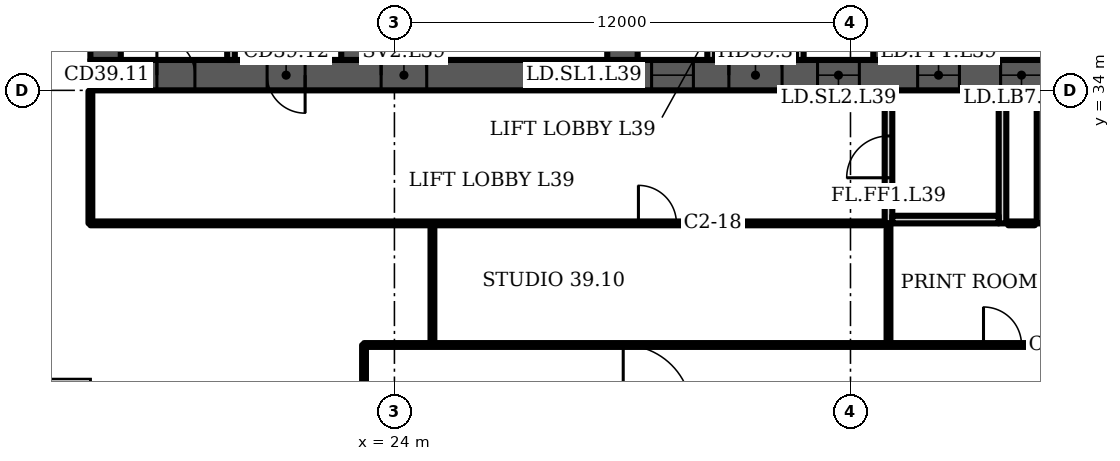
"""IFC4 building model, lengths in metres.
Left out: names, types, materials, properties, quantities, classifications, styles, units other than length and angle.
Written with IfcOpenShell. Run it as: python <this file> out.ifc"""

import sys

from ifc_helpers import new_model, si_unit, direction, frame, frame_2d, origin, place, context, subcontext, project, spatial, polyline, rectangle, outline, extrude, element, fill, save


model = new_model("IFC4")
c1 = context("Model", 3, precision=1e-05, world=origin(), true_north=direction((0.0, 1.0)))
c2 = subcontext(c1, "Body", "Model", "MODEL_VIEW")
j1 = project(units=[si_unit("LENGTHUNIT", "METRE"), si_unit("PLANEANGLEUNIT", "RADIAN")], contexts=[c1])
p1 = place(None, origin())
s1 = spatial("IfcSite", under=j1, at=p1, CompositionType="ELEMENT")
p2 = place(p1, origin())
s2 = spatial("IfcBuilding", under=s1, at=p2, CompositionType="ELEMENT")
p3 = place(p2, frame((0.0, 0.0, 162.7)))
s3 = spatial("IfcBuildingStorey", under=s2, at=p3, CompositionType="ELEMENT", Elevation=162.7)
p4 = place(p3, frame((16.0, 34.4, 0.0), z_axis=(0.0, 0.0, 1.0), x_axis=(1.0, 0.0, 0.0)))
e1 = element("IfcWall", 1, at=p4, inside=s3, PredefinedType="SHEAR", context=c2, shape_type="SweptSolid", body=[
    extrude(rectangle(XDim=42.0, YDim=0.8, at=frame_2d((21.0, 0.0))), origin(), (0.0, 0.0, 1.0), 3.6),
])
p5 = place(p4, frame((1.75, 0.0, 0.0)))
e2 = element("IfcOpeningElement", 2, at=p5, cuts=e1, PredefinedType="OPENING", context=c2, shape_type="SweptSolid", body=[
    extrude(rectangle(XDim=1.0, YDim=2.1, at=frame_2d((0.5, 1.05))), frame((0.0, 0.41, 0.0), z_axis=(0.0, -1.0, 0.0), x_axis=(1.0, 0.0, 0.0)), (0.0, 0.0, 1.0), 0.82),
])
p6 = place(p4, frame((4.65, 0.0, 0.0)))
e3 = element("IfcOpeningElement", 3, at=p6, cuts=e1, PredefinedType="OPENING", context=c2, shape_type="SweptSolid", body=[
    extrude(rectangle(XDim=1.0, YDim=2.1, at=frame_2d((0.5, 1.05))), frame((0.0, 0.41, 0.0), z_axis=(0.0, -1.0, 0.0), x_axis=(1.0, 0.0, 0.0)), (0.0, 0.0, 1.0), 0.82),
])
p7 = place(p4, frame((7.65, 0.0, 0.0)))
e4 = element("IfcOpeningElement", 4, at=p7, cuts=e1, PredefinedType="OPENING", context=c2, shape_type="SweptSolid", body=[
    extrude(rectangle(XDim=1.2, YDim=2.1, at=frame_2d((0.6, 1.05))), frame((0.0, 0.41, 0.0), z_axis=(0.0, -1.0, 0.0), x_axis=(1.0, 0.0, 0.0)), (0.0, 0.0, 1.0), 0.82),
])
p8 = place(p4, frame((14.767, 0.0, 0.0)))
e5 = element("IfcOpeningElement", 5, at=p8, cuts=e1, PredefinedType="OPENING", context=c2, shape_type="SweptSolid", body=[
    extrude(rectangle(XDim=1.1, YDim=2.1, at=frame_2d((0.55, 1.05))), frame((0.0, 0.41, 0.0), z_axis=(0.0, -1.0, 0.0), x_axis=(1.0, 0.0, 0.0)), (0.0, 0.0, 1.0), 0.82),
])
p9 = place(p4, frame((19.133, 0.0, 0.0)))
e6 = element("IfcOpeningElement", 6, at=p9, cuts=e1, PredefinedType="OPENING", context=c2, shape_type="SweptSolid", body=[
    extrude(rectangle(XDim=1.1, YDim=2.1, at=frame_2d((0.55, 1.05))), frame((0.0, 0.41, 0.0), z_axis=(0.0, -1.0, 0.0), x_axis=(1.0, 0.0, 0.0)), (0.0, 0.0, 1.0), 0.82),
])
p10 = place(p4, frame((16.8, 0.0, 0.0)))
e7 = element("IfcOpeningElement", 7, at=p10, cuts=e1, PredefinedType="OPENING", context=c2, shape_type="SweptSolid", body=[
    extrude(rectangle(XDim=1.4, YDim=2.1, at=frame_2d((0.7, 1.05))), frame((0.0, 0.41, 0.0), z_axis=(0.0, -1.0, 0.0), x_axis=(1.0, 0.0, 0.0)), (0.0, 0.0, 1.0), 0.82),
])
p11 = place(p4, frame((21.767, 0.0, 0.0)))
e8 = element("IfcOpeningElement", 8, at=p11, cuts=e1, PredefinedType="OPENING", context=c2, shape_type="SweptSolid", body=[
    extrude(rectangle(XDim=1.1, YDim=2.1, at=frame_2d((0.55, 1.05))), frame((0.0, 0.41, 0.0), z_axis=(0.0, -1.0, 0.0), x_axis=(1.0, 0.0, 0.0)), (0.0, 0.0, 1.0), 0.82),
])
p12 = place(p4, frame((23.95, 0.0, 0.0)))
e9 = element("IfcOpeningElement", 9, at=p12, cuts=e1, PredefinedType="OPENING", context=c2, shape_type="SweptSolid", body=[
    extrude(rectangle(XDim=1.1, YDim=2.1, at=frame_2d((0.55, 1.05))), frame((0.0, 0.41, 0.0), z_axis=(0.0, -1.0, 0.0), x_axis=(1.0, 0.0, 0.0)), (0.0, 0.0, 1.0), 0.82),
])
p13 = place(p4, frame((26.133, 0.0, 0.0)))
e10 = element("IfcOpeningElement", 10, at=p13, cuts=e1, PredefinedType="OPENING", context=c2, shape_type="SweptSolid", body=[
    extrude(rectangle(XDim=1.1, YDim=2.1, at=frame_2d((0.55, 1.05))), frame((0.0, 0.41, 0.0), z_axis=(0.0, -1.0, 0.0), x_axis=(1.0, 0.0, 0.0)), (0.0, 0.0, 1.0), 0.82),
])
p14 = place(p4, frame((33.15, 0.0, 0.0)))
e11 = element("IfcOpeningElement", 11, at=p14, cuts=e1, PredefinedType="OPENING", context=c2, shape_type="SweptSolid", body=[
    extrude(rectangle(XDim=1.2, YDim=2.1, at=frame_2d((0.6, 1.05))), frame((0.0, 0.41, 0.0), z_axis=(0.0, -1.0, 0.0), x_axis=(1.0, 0.0, 0.0)), (0.0, 0.0, 1.0), 0.82),
])
p15 = place(p4, frame((35.817, 0.0, 0.0)))
e12 = element("IfcOpeningElement", 12, at=p15, cuts=e1, PredefinedType="OPENING", context=c2, shape_type="SweptSolid", body=[
    extrude(rectangle(XDim=1.0, YDim=2.1, at=frame_2d((0.5, 1.05))), frame((0.0, 0.41, 0.0), z_axis=(0.0, -1.0, 0.0), x_axis=(1.0, 0.0, 0.0)), (0.0, 0.0, 1.0), 0.82),
])
p16 = place(p4, frame((39.95, 0.0, 0.0)))
e13 = element("IfcOpeningElement", 13, at=p16, cuts=e1, PredefinedType="OPENING", context=c2, shape_type="SweptSolid", body=[
    extrude(rectangle(XDim=1.0, YDim=2.1, at=frame_2d((0.5, 1.05))), frame((0.0, 0.41, 0.0), z_axis=(0.0, -1.0, 0.0), x_axis=(1.0, 0.0, 0.0)), (0.0, 0.0, 1.0), 0.82),
])
p17 = place(p4, frame((37.767, 0.0, 0.0)))
e14 = element("IfcOpeningElement", 14, at=p17, cuts=e1, PredefinedType="OPENING", context=c2, shape_type="SweptSolid", body=[
    extrude(rectangle(XDim=1.4, YDim=2.1, at=frame_2d((0.7, 1.05))), frame((0.0, 0.41, 0.0), z_axis=(0.0, -1.0, 0.0), x_axis=(1.0, 0.0, 0.0)), (0.0, 0.0, 1.0), 0.82),
])
p18 = place(p3, frame((16.4, 34.8, 0.0), z_axis=(0.0, 0.0, 1.0), x_axis=(0.0, 1.0, 0.0)))
e15 = element("IfcWall", 15, at=p18, inside=s3, PredefinedType="SHEAR", context=c2, shape_type="SweptSolid", body=[
    extrude(rectangle(XDim=13.184, YDim=0.8, at=frame_2d((6.592, 0.0))), origin(), (0.0, 0.0, 1.0), 3.6),
])
p19 = place(p3, frame((23.0, 34.8, 0.0), z_axis=(0.0, 0.0, 1.0), x_axis=(0.0, 1.0, 0.0)))
e16 = element("IfcWall", 16, at=p19, inside=s3, PredefinedType="SHEAR", context=c2, shape_type="SweptSolid", body=[
    extrude(rectangle(XDim=13.762, YDim=0.8, at=frame_2d((6.881, 0.0))), origin(), (0.0, 0.0, 1.0), 3.6),
])
p20 = place(p19, frame((10.0, 0.0, 0.0)))
e17 = element("IfcOpeningElement", 17, at=p20, cuts=e16, PredefinedType="OPENING", context=c2, shape_type="SweptSolid", body=[
    extrude(rectangle(XDim=1.0, YDim=2.1, at=frame_2d((0.5, 1.05))), frame((0.0, 0.41, 0.0), z_axis=(0.0, -1.0, 0.0), x_axis=(1.0, 0.0, 0.0)), (0.0, 0.0, 1.0), 0.82),
])
p21 = place(p3, frame((30.0, 34.8, 0.0), z_axis=(0.0, 0.0, 1.0), x_axis=(0.0, 1.0, 0.0)))
e18 = element("IfcWall", 18, at=p21, inside=s3, PredefinedType="SHEAR", context=c2, shape_type="SweptSolid", body=[
    extrude(rectangle(XDim=14.374, YDim=0.8, at=frame_2d((7.187, 0.0))), origin(), (0.0, 0.0, 1.0), 3.6),
])
p22 = place(p21, frame((3.6, 0.0, 0.0)))
e19 = element("IfcOpeningElement", 19, at=p22, cuts=e18, PredefinedType="OPENING", context=c2, shape_type="SweptSolid", body=[
    extrude(rectangle(XDim=1.1, YDim=2.1, at=frame_2d((0.55, 1.05))), frame((0.0, 0.41, 0.0), z_axis=(0.0, -1.0, 0.0), x_axis=(1.0, 0.0, 0.0)), (0.0, 0.0, 1.0), 0.82),
])
p23 = place(p3, frame((37.0, 34.8, 0.0), z_axis=(0.0, 0.0, 1.0), x_axis=(0.0, 1.0, 0.0)))
e20 = element("IfcWall", 20, at=p23, inside=s3, PredefinedType="SHEAR", context=c2, shape_type="SweptSolid", body=[
    extrude(rectangle(XDim=14.987, YDim=0.8, at=frame_2d((7.493, 0.0))), origin(), (0.0, 0.0, 1.0), 3.6),
])
p24 = place(p23, frame((11.312, 0.0, 0.0)))
e21 = element("IfcOpeningElement", 21, at=p24, cuts=e20, PredefinedType="OPENING", context=c2, shape_type="SweptSolid", body=[
    extrude(rectangle(XDim=1.0, YDim=2.1, at=frame_2d((0.5, 1.05))), frame((0.0, 0.41, 0.0), z_axis=(0.0, -1.0, 0.0), x_axis=(1.0, 0.0, 0.0)), (0.0, 0.0, 1.0), 0.82),
])
p25 = place(p23, frame((3.6, 0.0, 0.0)))
e22 = element("IfcOpeningElement", 22, at=p25, cuts=e20, PredefinedType="OPENING", context=c2, shape_type="SweptSolid", body=[
    extrude(rectangle(XDim=1.1, YDim=2.1, at=frame_2d((0.55, 1.05))), frame((0.0, 0.41, 0.0), z_axis=(0.0, -1.0, 0.0), x_axis=(1.0, 0.0, 0.0)), (0.0, 0.0, 1.0), 0.82),
])
p26 = place(p3, frame((19.7, 34.8, 0.0), z_axis=(0.0, 0.0, 1.0), x_axis=(0.0, 1.0, 0.0)))
e23 = element("IfcWall", 23, at=p26, inside=s3, PredefinedType="PARTITIONING", context=c2, shape_type="SweptSolid", body=[
    extrude(rectangle(XDim=13.234, YDim=0.2, at=frame_2d((6.617, 0.0))), origin(), (0.0, 0.0, 1.0), 3.2),
])
p27 = place(p3, frame((0.0, 0.0, -0.0)))
e24 = element("IfcWall", 24, at=p27, inside=s3, PredefinedType="PARTITIONING", context=c2, shape_type="SweptSolid", body=[
    extrude(outline(polyline([(32.233, 37.65), (30.4, 37.65), (30.4, 37.85), (32.233, 37.85), (32.433, 37.85), (32.433, 34.8), (32.233, 34.8), (32.233, 37.65)])), origin(), (0.0, 0.0, 1.0), 3.2),
])
p28 = place(p3, frame((0.0, 0.0, -0.0)))
e25 = element("IfcWall", 25, at=p28, inside=s3, PredefinedType="PARTITIONING", context=c2, shape_type="SweptSolid", body=[
    extrude(outline(polyline([(34.567, 37.85), (34.767, 37.85), (36.6, 37.85), (36.6, 37.65), (34.767, 37.65), (34.767, 34.8), (34.567, 34.8), (34.567, 37.85)])), origin(), (0.0, 0.0, 1.0), 3.2),
])
p29 = place(p3, frame((0.0, 0.0, -0.0)))
e26 = element("IfcWall", 26, at=p29, inside=s3, PredefinedType="PARTITIONING", context=c2, shape_type="SweptSolid", body=[
    extrude(outline(polyline([(41.567, 37.1), (39.433, 37.1), (39.433, 34.8), (39.233, 34.8), (39.233, 37.65), (37.4, 37.65), (37.4, 37.85), (39.233, 37.85), (39.433, 37.85), (39.433, 37.3), (41.567, 37.3), (41.567, 37.55), (41.767, 37.55), (43.6, 37.55), (43.6, 37.35), (41.767, 37.35), (41.767, 34.8), (41.567, 34.8), (41.567, 37.1)])), origin(), (0.0, 0.0, 1.0), 3.2),
])
p30 = place(p3, frame((37.0, 30.5, 0.0), z_axis=(0.0, 0.0, 1.0), x_axis=(0.0, 1.0, 0.0)))
e27 = element("IfcWall", 27, at=p30, inside=s3, PredefinedType="PARTITIONING", context=c2, shape_type="SweptSolid", body=[
    extrude(rectangle(XDim=3.5, YDim=0.2, at=frame_2d((1.75, 0.0))), origin(), (0.0, 0.0, 1.0), 3.2),
])
p31 = place(p30, frame((1.2, 0.0, 0.0)))
e28 = element("IfcOpeningElement", 28, at=p31, cuts=e27, PredefinedType="OPENING", context=c2, shape_type="SweptSolid", body=[
    extrude(rectangle(XDim=1.1, YDim=2.1, at=frame_2d((0.55, 1.05))), frame((0.0, 0.11, 0.0), z_axis=(0.0, -1.0, 0.0), x_axis=(1.0, 0.0, 0.0)), (0.0, 0.0, 1.0), 0.22),
])
p32 = place(p3, frame((40.0, 30.5, 0.0), z_axis=(0.0, 0.0, 1.0), x_axis=(0.0, 1.0, 0.0)))
e29 = element("IfcWall", 29, at=p32, inside=s3, PredefinedType="PARTITIONING", context=c2, shape_type="SweptSolid", body=[
    extrude(rectangle(XDim=3.5, YDim=0.2, at=frame_2d((1.75, 0.0))), origin(), (0.0, 0.0, 1.0), 3.2),
])
p33 = place(p3, frame((37.1, 30.6, 0.0), z_axis=(0.0, 0.0, 1.0), x_axis=(1.0, 0.0, 0.0)))
e30 = element("IfcWall", 30, at=p33, inside=s3, PredefinedType="PARTITIONING", context=c2, shape_type="SweptSolid", body=[
    extrude(rectangle(XDim=2.8, YDim=0.2, at=frame_2d((1.4, 0.0))), origin(), (0.0, 0.0, 1.0), 3.2),
])
p34 = place(p3, frame((41.0, 30.5, 0.0), z_axis=(0.0, 0.0, 1.0), x_axis=(0.0, 1.0, 0.0)))
e31 = element("IfcWall", 31, at=p34, inside=s3, PredefinedType="PARTITIONING", context=c2, shape_type="SweptSolid", body=[
    extrude(rectangle(XDim=3.5, YDim=0.2, at=frame_2d((1.75, 0.0))), origin(), (0.0, 0.0, 1.0), 3.2),
])
p35 = place(p3, frame((16.0, 30.5, 0.0), z_axis=(0.0, 0.0, 1.0), x_axis=(0.0, 1.0, 0.0)))
e32 = element("IfcWall", 32, at=p35, inside=s3, PredefinedType="PARTITIONING", context=c2, shape_type="SweptSolid", body=[
    extrude(rectangle(XDim=3.48, YDim=0.1, at=frame_2d((1.74, 0.0))), origin(), (0.0, 0.0, 1.0), 3.2),
])
p36 = place(p3, frame((16.0, 30.5, 0.0), z_axis=(0.0, 0.0, 1.0), x_axis=(1.0, 0.0, 0.0)))
e33 = element("IfcWall", 33, at=p36, inside=s3, PredefinedType="PARTITIONING", context=c2, shape_type="SweptSolid", body=[
    extrude(rectangle(XDim=20.85, YDim=0.1, at=frame_2d((10.425, 0.0))), origin(), (0.0, 0.0, 1.0), 3.2),
])
p37 = place(p36, frame((14.42, 0.0, 0.0)))
e34 = element("IfcOpeningElement", 34, at=p37, cuts=e33, PredefinedType="OPENING", context=c2, shape_type="SweptSolid", body=[
    extrude(rectangle(XDim=1.0, YDim=2.1, at=frame_2d((0.5, 1.05))), frame((0.0, 0.06, 0.0), z_axis=(0.0, -1.0, 0.0), x_axis=(1.0, 0.0, 0.0)), (0.0, 0.0, 1.0), 0.12),
])
p38 = place(p3, frame((23.2, 25.125, 0.0), z_axis=(0.0, 0.0, 1.0), x_axis=(0.0, 1.0, 0.0)))
e35 = element("IfcWall", 35, at=p38, inside=s3, PredefinedType="PARTITIONING", context=c2, shape_type="SweptSolid", body=[
    extrude(rectangle(XDim=2.175, YDim=0.1, at=frame_2d((1.087, 0.0))), origin(), (0.0, 0.0, 1.0), 3.2),
])
p39 = place(p3, frame((23.2, 27.3, 0.0), z_axis=(0.0, 0.0, 1.0), x_axis=(1.0, 0.0, 0.0)))
e36 = element("IfcWall", 36, at=p39, inside=s3, PredefinedType="PARTITIONING", context=c2, shape_type="SweptSolid", body=[
    extrude(rectangle(XDim=33.9, YDim=0.1, at=frame_2d((16.95, 0.0))), origin(), (0.0, 0.0, 1.0), 3.2),
])
p40 = place(p39, frame((16.3, 0.0, 0.0)))
e37 = element("IfcOpeningElement", 37, at=p40, cuts=e36, PredefinedType="OPENING", context=c2, shape_type="SweptSolid", body=[
    extrude(rectangle(XDim=1.0, YDim=2.1, at=frame_2d((0.5, 1.05))), frame((0.0, 0.06, 0.0), z_axis=(0.0, -1.0, 0.0), x_axis=(1.0, 0.0, 0.0)), (0.0, 0.0, 1.0), 0.12),
])
p41 = place(p39, frame((20.72, 0.0, 0.0)))
e38 = element("IfcOpeningElement", 38, at=p41, cuts=e36, PredefinedType="OPENING", context=c2, shape_type="SweptSolid", body=[
    extrude(rectangle(XDim=1.0, YDim=2.1, at=frame_2d((0.5, 1.05))), frame((0.0, 0.06, 0.0), z_axis=(0.0, -1.0, 0.0), x_axis=(1.0, 0.0, 0.0)), (0.0, 0.0, 1.0), 0.12),
])
p42 = place(p39, frame((23.54, 0.0, 0.0)))
e39 = element("IfcOpeningElement", 39, at=p42, cuts=e36, PredefinedType="OPENING", context=c2, shape_type="SweptSolid", body=[
    extrude(rectangle(XDim=1.0, YDim=2.1, at=frame_2d((0.5, 1.05))), frame((0.0, 0.06, 0.0), z_axis=(0.0, -1.0, 0.0), x_axis=(1.0, 0.0, 0.0)), (0.0, 0.0, 1.0), 0.12),
])
p43 = place(p39, frame((26.36, 0.0, 0.0)))
e40 = element("IfcOpeningElement", 40, at=p43, cuts=e36, PredefinedType="OPENING", context=c2, shape_type="SweptSolid", body=[
    extrude(rectangle(XDim=1.0, YDim=2.1, at=frame_2d((0.5, 1.05))), frame((0.0, 0.06, 0.0), z_axis=(0.0, -1.0, 0.0), x_axis=(1.0, 0.0, 0.0)), (0.0, 0.0, 1.0), 0.12),
])
p44 = place(p39, frame((29.18, 0.0, 0.0)))
e41 = element("IfcOpeningElement", 41, at=p44, cuts=e36, PredefinedType="OPENING", context=c2, shape_type="SweptSolid", body=[
    extrude(rectangle(XDim=1.0, YDim=2.1, at=frame_2d((0.5, 1.05))), frame((0.0, 0.06, 0.0), z_axis=(0.0, -1.0, 0.0), x_axis=(1.0, 0.0, 0.0)), (0.0, 0.0, 1.0), 0.12),
])
p45 = place(p39, frame((32.0, 0.0, 0.0)))
e42 = element("IfcOpeningElement", 42, at=p45, cuts=e36, PredefinedType="OPENING", context=c2, shape_type="SweptSolid", body=[
    extrude(rectangle(XDim=1.0, YDim=2.1, at=frame_2d((0.5, 1.05))), frame((0.0, 0.06, 0.0), z_axis=(0.0, -1.0, 0.0), x_axis=(1.0, 0.0, 0.0)), (0.0, 0.0, 1.0), 0.12),
])
for number, where, z_axis, x_axis in (
    (43, (25.0, 27.3, 0.0), (0.0, 0.0, 1.0), (0.0, 1.0, 0.0)),
    (44, (37.0, 27.3, 0.0), (0.0, 0.0, 1.0), (0.0, 1.0, 0.0)),
):
    element("IfcWall", number, at=place(p3, frame(where, z_axis=z_axis, x_axis=x_axis)), inside=s3, PredefinedType="PARTITIONING", context=c2, shape_type="SweptSolid", body=[
        extrude(rectangle(XDim=3.2, YDim=0.1, at=frame_2d((1.6, 0.0))), origin(), (0.0, 0.0, 1.0), 3.2),
    ])
p46 = place(p3, frame((40.15, 30.5, 0.0), z_axis=(0.0, 0.0, 1.0), x_axis=(1.0, 0.0, 0.0)))
e45 = element("IfcWall", 45, at=p46, inside=s3, PredefinedType="PARTITIONING", context=c2, shape_type="SweptSolid", body=[
    extrude(rectangle(XDim=0.7, YDim=0.1, at=frame_2d((0.35, 0.0))), origin(), (0.0, 0.0, 1.0), 3.2),
])
p47 = place(p5, origin())
e46 = element("IfcDoor", 46, at=p47, inside=s3, OperationType="SINGLE_SWING_LEFT", PredefinedType="DOOR", context=c2, shape_type="SweptSolid", body=[
    extrude(rectangle(XDim=1.0, YDim=2.1, at=frame_2d((0.5, 1.05))), frame((0.0, 0.4, 0.0), z_axis=(0.0, -1.0, 0.0), x_axis=(1.0, 0.0, 0.0)), (0.0, 0.0, 1.0), 0.8),
])
fill(e2, e46)
p48 = place(p6, origin())
e47 = element("IfcDoor", 47, at=p48, inside=s3, OperationType="SINGLE_SWING_RIGHT", PredefinedType="DOOR", context=c2, shape_type="SweptSolid", body=[
    extrude(rectangle(XDim=1.0, YDim=2.1, at=frame_2d((0.5, 1.05))), frame((0.0, 0.4, 0.0), z_axis=(0.0, -1.0, 0.0), x_axis=(1.0, 0.0, 0.0)), (0.0, 0.0, 1.0), 0.8),
])
fill(e3, e47)
p49 = place(p7, origin())
e48 = element("IfcDoor", 48, at=p49, inside=s3, OperationType="SINGLE_SWING_LEFT", PredefinedType="DOOR", context=c2, shape_type="SweptSolid", body=[
    extrude(rectangle(XDim=1.2, YDim=2.1, at=frame_2d((0.6, 1.05))), frame((0.0, 0.025, 0.0), z_axis=(0.0, -1.0, 0.0), x_axis=(1.0, 0.0, 0.0)), (0.0, 0.0, 1.0), 0.05),
])
fill(e4, e48)
p50 = place(p8, origin())
e49 = element("IfcDoor", 49, at=p50, inside=s3, OperationType="DOUBLE_DOOR_SLIDING", PredefinedType="DOOR", context=c2, shape_type="SweptSolid", body=[
    extrude(rectangle(XDim=1.1, YDim=2.1, at=frame_2d((0.55, 1.05))), frame((0.0, 0.025, 0.0), z_axis=(0.0, -1.0, 0.0), x_axis=(1.0, 0.0, 0.0)), (0.0, 0.0, 1.0), 0.05),
])
fill(e5, e49)
p51 = place(p9, origin())
e50 = element("IfcDoor", 50, at=p51, inside=s3, OperationType="DOUBLE_DOOR_SLIDING", PredefinedType="DOOR", context=c2, shape_type="SweptSolid", body=[
    extrude(rectangle(XDim=1.1, YDim=2.1, at=frame_2d((0.55, 1.05))), frame((0.0, 0.025, 0.0), z_axis=(0.0, -1.0, 0.0), x_axis=(1.0, 0.0, 0.0)), (0.0, 0.0, 1.0), 0.05),
])
fill(e6, e50)
p52 = place(p10, origin())
e51 = element("IfcDoor", 51, at=p52, inside=s3, OperationType="DOUBLE_DOOR_SINGLE_SWING", PredefinedType="DOOR", context=c2, shape_type="SweptSolid", body=[
    extrude(rectangle(XDim=1.4, YDim=2.1, at=frame_2d((0.7, 1.05))), frame((0.0, 0.025, 0.0), z_axis=(0.0, -1.0, 0.0), x_axis=(1.0, 0.0, 0.0)), (0.0, 0.0, 1.0), 0.05),
])
fill(e7, e51)
p53 = place(p11, origin())
e52 = element("IfcDoor", 52, at=p53, inside=s3, OperationType="DOUBLE_DOOR_SLIDING", PredefinedType="DOOR", context=c2, shape_type="SweptSolid", body=[
    extrude(rectangle(XDim=1.1, YDim=2.1, at=frame_2d((0.55, 1.05))), frame((0.0, 0.025, 0.0), z_axis=(0.0, -1.0, 0.0), x_axis=(1.0, 0.0, 0.0)), (0.0, 0.0, 1.0), 0.05),
])
fill(e8, e52)
p54 = place(p12, origin())
e53 = element("IfcDoor", 53, at=p54, inside=s3, OperationType="DOUBLE_DOOR_SLIDING", PredefinedType="DOOR", context=c2, shape_type="SweptSolid", body=[
    extrude(rectangle(XDim=1.1, YDim=2.1, at=frame_2d((0.55, 1.05))), frame((0.0, 0.025, 0.0), z_axis=(0.0, -1.0, 0.0), x_axis=(1.0, 0.0, 0.0)), (0.0, 0.0, 1.0), 0.05),
])
fill(e9, e53)
p55 = place(p31, origin())
e54 = element("IfcDoor", 54, at=p55, inside=s3, OperationType="SINGLE_SWING_LEFT", PredefinedType="DOOR", context=c2, shape_type="SweptSolid", body=[
    extrude(rectangle(XDim=1.1, YDim=2.1, at=frame_2d((0.55, 1.05))), frame((0.0, 0.025, 0.0), z_axis=(0.0, -1.0, 0.0), x_axis=(1.0, 0.0, 0.0)), (0.0, 0.0, 1.0), 0.05),
])
fill(e28, e54)
p56 = place(p40, origin())
e55 = element("IfcDoor", 55, at=p56, inside=s3, OperationType="SINGLE_SWING_LEFT", PredefinedType="DOOR", context=c2, shape_type="SweptSolid", body=[
    extrude(rectangle(XDim=1.0, YDim=2.1, at=frame_2d((0.5, 1.05))), frame((0.0, 0.025, 0.0), z_axis=(0.0, -1.0, 0.0), x_axis=(1.0, 0.0, 0.0)), (0.0, 0.0, 1.0), 0.05),
])
fill(e37, e55)
p57 = place(p37, origin())
e56 = element("IfcDoor", 56, at=p57, inside=s3, OperationType="SINGLE_SWING_LEFT", PredefinedType="DOOR", context=c2, shape_type="SweptSolid", body=[
    extrude(rectangle(XDim=1.0, YDim=2.1, at=frame_2d((0.5, 1.05))), frame((0.0, 0.025, 0.0), z_axis=(0.0, -1.0, 0.0), x_axis=(1.0, 0.0, 0.0)), (0.0, 0.0, 1.0), 0.05),
])
fill(e34, e56)
save(model, sys.argv[1])
